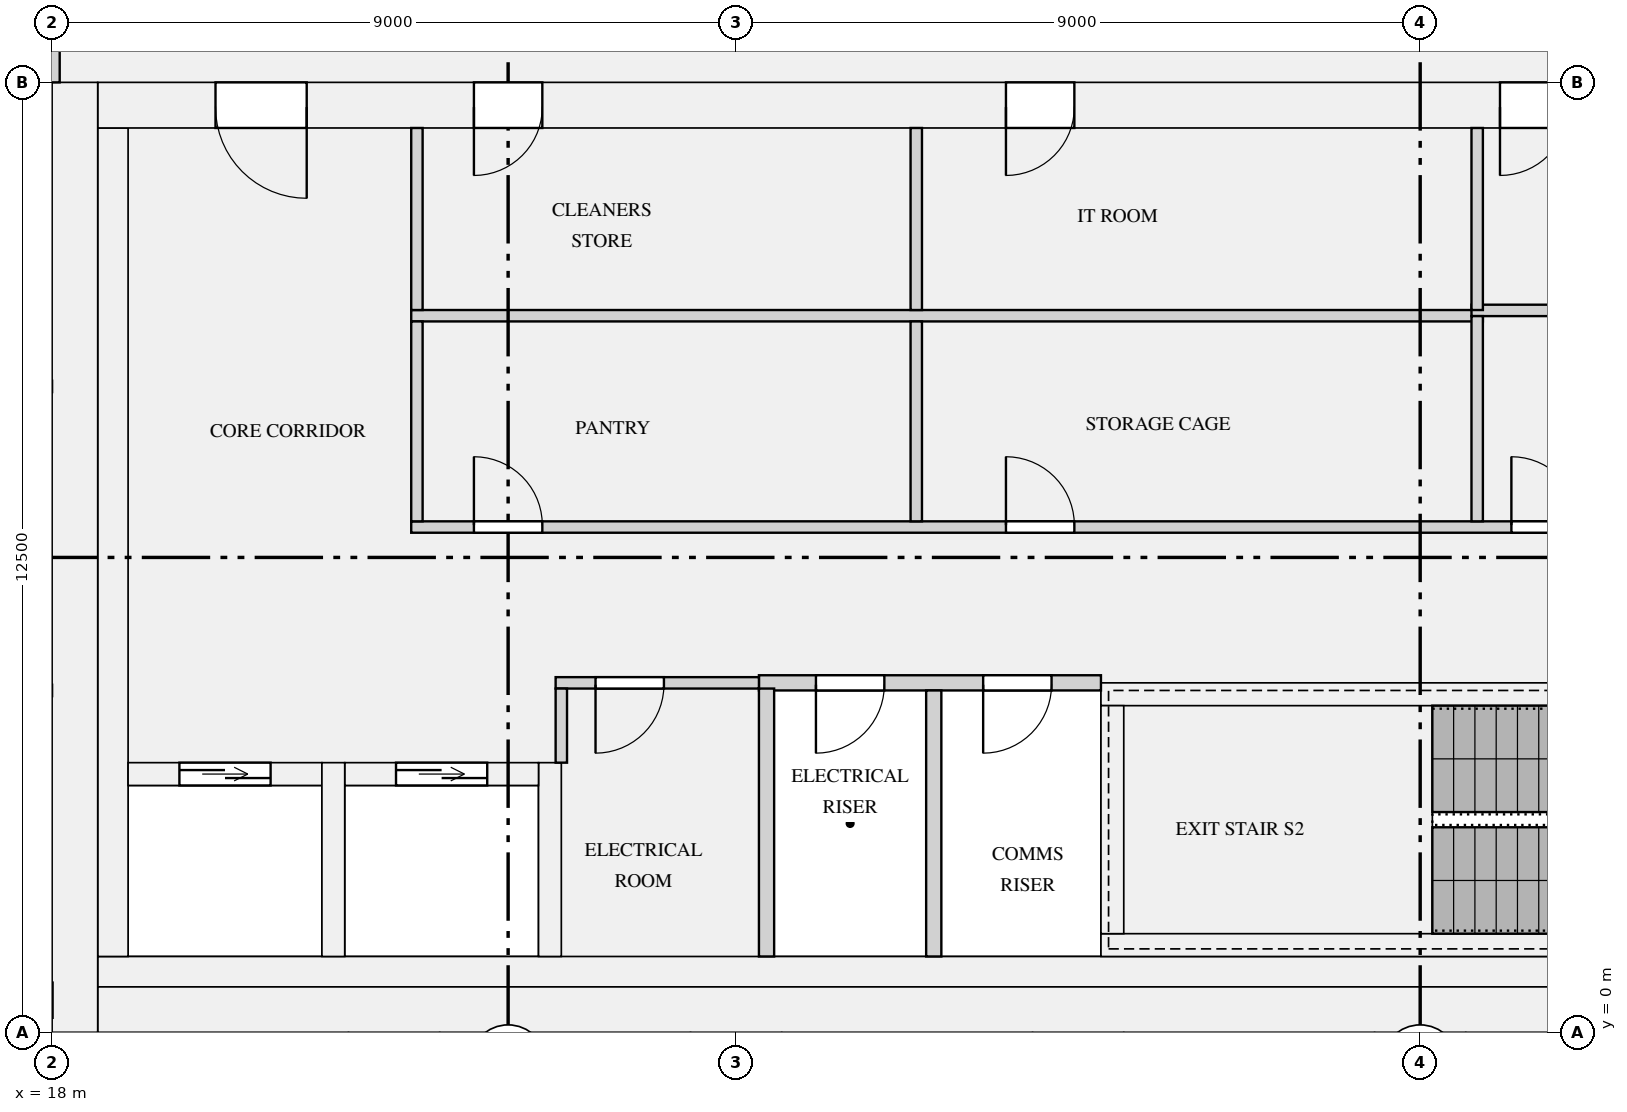
"""IFC4 building model, lengths in metres.
Left out: names, types, materials, properties, quantities, classifications, styles, units other than length and angle.
Written with IfcOpenShell. Run it as: python <this file> out.ifc"""

import sys

from ifc_helpers import new_model, si_unit, direction, frame, frame_2d, origin, place, context, subcontext, project, spatial, rectangle, extrude, element, fill, save


model = new_model("IFC4")
c1 = context("Model", 3, precision=1e-05, world=origin(), true_north=direction((0.0, 1.0)))
c2 = subcontext(c1, "Body", "Model", "MODEL_VIEW")
j1 = project(units=[si_unit("LENGTHUNIT", "METRE"), si_unit("PLANEANGLEUNIT", "RADIAN")], contexts=[c1])
p1 = place(None, origin())
s1 = spatial("IfcSite", under=j1, at=p1, CompositionType="ELEMENT")
p2 = place(p1, origin())
s2 = spatial("IfcBuilding", under=s1, at=p2, CompositionType="ELEMENT")
p3 = place(p2, frame((0.0, 0.0, 229.5)))
s3 = spatial("IfcBuildingStorey", under=s2, at=p3, CompositionType="ELEMENT", Elevation=229.5)
p4 = place(p3, frame((18.3, 0.0, 0.0), z_axis=(0.0, 0.0, 1.0), x_axis=(0.0, 1.0, 0.0)))
e1 = element("IfcWall", 1, at=p4, inside=s3, PredefinedType="SHEAR", context=c2, shape_type="SweptSolid", body=[
    extrude(rectangle(XDim=12.5, YDim=0.6, at=frame_2d((6.25, 0.0))), origin(), (0.0, 0.0, 1.0), 3.15),
])
p5 = place(p3, frame((18.6, 0.3, 0.0), z_axis=(0.0, 0.0, 1.0), x_axis=(1.0, 0.0, 0.0)))
e2 = element("IfcWall", 2, at=p5, inside=s3, PredefinedType="SHEAR", context=c2, shape_type="SweptSolid", body=[
    extrude(rectangle(XDim=34.8, YDim=0.6, at=frame_2d((17.4, 0.0))), origin(), (0.0, 0.0, 1.0), 3.15),
])
p6 = place(p3, frame((18.6, 12.2, 0.0), z_axis=(0.0, 0.0, 1.0), x_axis=(1.0, 0.0, 0.0)))
e3 = element("IfcWall", 3, at=p6, inside=s3, PredefinedType="SHEAR", context=c2, shape_type="SweptSolid", body=[
    extrude(rectangle(XDim=34.8, YDim=0.6, at=frame_2d((17.4, 0.0))), origin(), (0.0, 0.0, 1.0), 3.15),
])
p7 = place(p6, frame((24.575, 0.0, 0.0)))
e4 = element("IfcOpeningElement", 4, at=p7, cuts=e3, PredefinedType="OPENING", context=c2, shape_type="SweptSolid", body=[
    extrude(rectangle(XDim=1.1, YDim=2.1, at=frame_2d((0.55, 1.05))), frame((0.0, 0.31, 0.0), z_axis=(0.0, -1.0, 0.0), x_axis=(1.0, 0.0, 0.0)), (0.0, 0.0, 1.0), 0.62),
])
p8 = place(p6, frame((26.825, 0.0, 0.0)))
e5 = element("IfcOpeningElement", 5, at=p8, cuts=e3, PredefinedType="OPENING", context=c2, shape_type="SweptSolid", body=[
    extrude(rectangle(XDim=1.1, YDim=2.1, at=frame_2d((0.55, 1.05))), frame((0.0, 0.31, 0.0), z_axis=(0.0, -1.0, 0.0), x_axis=(1.0, 0.0, 0.0)), (0.0, 0.0, 1.0), 0.62),
])
p9 = place(p6, frame((29.075, 0.0, 0.0)))
e6 = element("IfcOpeningElement", 6, at=p9, cuts=e3, PredefinedType="OPENING", context=c2, shape_type="SweptSolid", body=[
    extrude(rectangle(XDim=1.1, YDim=2.1, at=frame_2d((0.55, 1.05))), frame((0.0, 0.31, 0.0), z_axis=(0.0, -1.0, 0.0), x_axis=(1.0, 0.0, 0.0)), (0.0, 0.0, 1.0), 0.62),
])
p10 = place(p6, frame((4.95, 0.0, 0.0)))
e7 = element("IfcOpeningElement", 7, at=p10, cuts=e3, PredefinedType="OPENING", context=c2, shape_type="SweptSolid", body=[
    extrude(rectangle(XDim=0.9, YDim=2.1, at=frame_2d((0.45, 1.05))), frame((0.0, 0.31, 0.0), z_axis=(0.0, -1.0, 0.0), x_axis=(1.0, 0.0, 0.0)), (0.0, 0.0, 1.0), 0.62),
])
p11 = place(p6, frame((11.95, 0.0, 0.0)))
e8 = element("IfcOpeningElement", 8, at=p11, cuts=e3, PredefinedType="OPENING", context=c2, shape_type="SweptSolid", body=[
    extrude(rectangle(XDim=0.9, YDim=2.1, at=frame_2d((0.45, 1.05))), frame((0.0, 0.31, 0.0), z_axis=(0.0, -1.0, 0.0), x_axis=(1.0, 0.0, 0.0)), (0.0, 0.0, 1.0), 0.62),
])
p12 = place(p6, frame((18.45, 0.0, 0.0)))
e9 = element("IfcOpeningElement", 9, at=p12, cuts=e3, PredefinedType="OPENING", context=c2, shape_type="SweptSolid", body=[
    extrude(rectangle(XDim=0.9, YDim=2.1, at=frame_2d((0.45, 1.05))), frame((0.0, 0.31, 0.0), z_axis=(0.0, -1.0, 0.0), x_axis=(1.0, 0.0, 0.0)), (0.0, 0.0, 1.0), 0.62),
])
p13 = place(p6, frame((1.55, 0.0, 0.0)))
e10 = element("IfcOpeningElement", 10, at=p13, cuts=e3, PredefinedType="OPENING", context=c2, shape_type="SweptSolid", body=[
    extrude(rectangle(XDim=1.2, YDim=2.1, at=frame_2d((0.6, 1.05))), frame((0.0, 0.31, 0.0), z_axis=(0.0, -1.0, 0.0), x_axis=(1.0, 0.0, 0.0)), (0.0, 0.0, 1.0), 0.62),
])
p14 = place(p6, frame((32.05, 0.0, 0.0)))
e11 = element("IfcOpeningElement", 11, at=p14, cuts=e3, PredefinedType="OPENING", context=c2, shape_type="SweptSolid", body=[
    extrude(rectangle(XDim=1.2, YDim=2.1, at=frame_2d((0.6, 1.05))), frame((0.0, 0.31, 0.0), z_axis=(0.0, -1.0, 0.0), x_axis=(1.0, 0.0, 0.0)), (0.0, 0.0, 1.0), 0.62),
])
p15 = place(p3, frame((18.8, 1.0, 0.0), z_axis=(0.0, 0.0, 1.0), x_axis=(0.0, 1.0, 0.0)))
e12 = element("IfcWall", 12, at=p15, inside=s3, PredefinedType="SHEAR", context=c2, shape_type="SweptSolid", body=[
    extrude(rectangle(XDim=10.9, YDim=0.4, at=frame_2d((5.45, 0.0))), origin(), (0.0, 0.0, 1.0), 3.15),
])
p16 = place(p3, frame((18.6, 0.8, 0.0), z_axis=(0.0, 0.0, 1.0), x_axis=(1.0, 0.0, 0.0)))
e13 = element("IfcWall", 13, at=p16, inside=s3, PredefinedType="SHEAR", context=c2, shape_type="SweptSolid", body=[
    extrude(rectangle(XDim=34.8, YDim=0.4, at=frame_2d((17.4, 0.0))), origin(), (0.0, 0.0, 1.0), 3.15),
])
p17 = place(p3, frame((19.0, 3.4, 0.0), z_axis=(0.0, 0.0, 1.0), x_axis=(1.0, 0.0, 0.0)))
e14 = element("IfcWall", 14, at=p17, inside=s3, PredefinedType="SHEAR", context=c2, shape_type="SweptSolid", body=[
    extrude(rectangle(XDim=2.55, YDim=0.3, at=frame_2d((1.275, 0.0))), origin(), (0.0, 0.0, 1.0), 3.15),
])
p18 = place(p17, frame((0.675, 0.0, 0.0)))
e15 = element("IfcOpeningElement", 15, at=p18, cuts=e14, PredefinedType="OPENING", context=c2, shape_type="SweptSolid", body=[
    extrude(rectangle(XDim=1.2, YDim=2.1, at=frame_2d((0.6, 1.05))), frame((0.0, 0.16, 0.0), z_axis=(0.0, -1.0, 0.0), x_axis=(1.0, 0.0, 0.0)), (0.0, 0.0, 1.0), 0.32),
])
p19 = place(p3, frame((21.85, 3.4, 0.0), z_axis=(0.0, 0.0, 1.0), x_axis=(1.0, 0.0, 0.0)))
e16 = element("IfcWall", 16, at=p19, inside=s3, PredefinedType="SHEAR", context=c2, shape_type="SweptSolid", body=[
    extrude(rectangle(XDim=2.55, YDim=0.3, at=frame_2d((1.275, 0.0))), origin(), (0.0, 0.0, 1.0), 3.15),
])
p20 = place(p19, frame((0.675, 0.0, 0.0)))
e17 = element("IfcOpeningElement", 17, at=p20, cuts=e16, PredefinedType="OPENING", context=c2, shape_type="SweptSolid", body=[
    extrude(rectangle(XDim=1.2, YDim=2.1, at=frame_2d((0.6, 1.05))), frame((0.0, 0.16, 0.0), z_axis=(0.0, -1.0, 0.0), x_axis=(1.0, 0.0, 0.0)), (0.0, 0.0, 1.0), 0.32),
])
for number, where, z_axis, x_axis in (
    (18, (21.7, 1.0, 0.0), (0.0, 0.0, 1.0), (0.0, 1.0, 0.0)),
    (19, (24.55, 1.0, 0.0), (0.0, 0.0, 1.0), (0.0, 1.0, 0.0)),
):
    element("IfcWall", number, at=place(p3, frame(where, z_axis=z_axis, x_axis=x_axis)), inside=s3, PredefinedType="SHEAR", context=c2, shape_type="SweptSolid", body=[
        extrude(rectangle(XDim=2.55, YDim=0.3, at=frame_2d((1.275, 0.0))), origin(), (0.0, 0.0, 1.0), 3.15),
    ])
p21 = place(p3, frame((31.8, 1.15, 0.0), z_axis=(0.0, 0.0, 1.0), x_axis=(1.0, 0.0, 0.0)))
e20 = element("IfcWall", 20, at=p21, inside=s3, PredefinedType="SHEAR", context=c2, shape_type="SweptSolid", body=[
    extrude(rectangle(XDim=8.4, YDim=0.3, at=frame_2d((4.2, 0.0))), origin(), (0.0, 0.0, 1.0), 3.15),
])
p22 = place(p3, frame((31.8, 4.45, 0.0), z_axis=(0.0, 0.0, 1.0), x_axis=(1.0, 0.0, 0.0)))
e21 = element("IfcWall", 21, at=p22, inside=s3, PredefinedType="SHEAR", context=c2, shape_type="SweptSolid", body=[
    extrude(rectangle(XDim=8.4, YDim=0.3, at=frame_2d((4.2, 0.0))), origin(), (0.0, 0.0, 1.0), 3.15),
])
p23 = place(p22, frame((6.8, 0.0, 0.0)))
e22 = element("IfcOpeningElement", 22, at=p23, cuts=e21, PredefinedType="OPENING", context=c2, shape_type="SweptSolid", body=[
    extrude(rectangle(XDim=1.1, YDim=2.1, at=frame_2d((0.55, 1.05))), frame((0.0, 0.16, 0.0), z_axis=(0.0, -1.0, 0.0), x_axis=(1.0, 0.0, 0.0)), (0.0, 0.0, 1.0), 0.32),
])
p24 = place(p3, frame((31.95, 1.3, 0.0), z_axis=(0.0, 0.0, 1.0), x_axis=(0.0, 1.0, 0.0)))
e23 = element("IfcWall", 23, at=p24, inside=s3, PredefinedType="SHEAR", context=c2, shape_type="SweptSolid", body=[
    extrude(rectangle(XDim=3.0, YDim=0.3, at=frame_2d((1.5, 0.0))), origin(), (0.0, 0.0, 1.0), 3.15),
])
p25 = place(p3, frame((27.3, 4.6, 0.0), z_axis=(0.0, 0.0, 1.0), x_axis=(1.0, 0.0, 0.0)))
e24 = element("IfcWall", 24, at=p25, inside=s3, PredefinedType="PARTITIONING", context=c2, shape_type="SweptSolid", body=[
    extrude(rectangle(XDim=4.5, YDim=0.2, at=frame_2d((2.25, 0.0))), origin(), (0.0, 0.0, 1.0), 2.83),
])
p26 = place(p25, frame((0.75, 0.0, 0.0)))
e25 = element("IfcOpeningElement", 25, at=p26, cuts=e24, PredefinedType="OPENING", context=c2, shape_type="SweptSolid", body=[
    extrude(rectangle(XDim=0.9, YDim=2.1, at=frame_2d((0.45, 1.05))), frame((0.0, 0.11, 0.0), z_axis=(0.0, -1.0, 0.0), x_axis=(1.0, 0.0, 0.0)), (0.0, 0.0, 1.0), 0.22),
])
p27 = place(p25, frame((2.95, 0.0, 0.0)))
e26 = element("IfcOpeningElement", 26, at=p27, cuts=e24, PredefinedType="OPENING", context=c2, shape_type="SweptSolid", body=[
    extrude(rectangle(XDim=0.9, YDim=2.1, at=frame_2d((0.45, 1.05))), frame((0.0, 0.11, 0.0), z_axis=(0.0, -1.0, 0.0), x_axis=(1.0, 0.0, 0.0)), (0.0, 0.0, 1.0), 0.22),
])
p28 = place(p3, frame((24.625, 4.6, 0.0), z_axis=(0.0, 0.0, 1.0), x_axis=(1.0, 0.0, 0.0)))
e27 = element("IfcWall", 27, at=p28, inside=s3, PredefinedType="PARTITIONING", context=c2, shape_type="SweptSolid", body=[
    extrude(rectangle(XDim=2.675, YDim=0.15, at=frame_2d((1.337, 0.0))), origin(), (0.0, 0.0, 1.0), 2.83),
])
p29 = place(p28, frame((0.525, 0.0, 0.0)))
e28 = element("IfcOpeningElement", 28, at=p29, cuts=e27, PredefinedType="OPENING", context=c2, shape_type="SweptSolid", body=[
    extrude(rectangle(XDim=0.9, YDim=2.1, at=frame_2d((0.45, 1.05))), frame((0.0, 0.085, 0.0), z_axis=(0.0, -1.0, 0.0), x_axis=(1.0, 0.0, 0.0)), (0.0, 0.0, 1.0), 0.17),
])
p30 = place(p3, frame((22.725, 6.65, 0.0), z_axis=(0.0, 0.0, 1.0), x_axis=(1.0, 0.0, 0.0)))
e29 = element("IfcWall", 29, at=p30, inside=s3, PredefinedType="PARTITIONING", context=c2, shape_type="SweptSolid", body=[
    extrude(rectangle(XDim=19.8, YDim=0.15, at=frame_2d((9.9, 0.0))), origin(), (0.0, 0.0, 1.0), 2.83),
])
p31 = place(p30, frame((0.825, 0.0, 0.0)))
e30 = element("IfcOpeningElement", 30, at=p31, cuts=e29, PredefinedType="OPENING", context=c2, shape_type="SweptSolid", body=[
    extrude(rectangle(XDim=0.9, YDim=2.1, at=frame_2d((0.45, 1.05))), frame((0.0, 0.085, 0.0), z_axis=(0.0, -1.0, 0.0), x_axis=(1.0, 0.0, 0.0)), (0.0, 0.0, 1.0), 0.17),
])
p32 = place(p30, frame((7.825, 0.0, 0.0)))
e31 = element("IfcOpeningElement", 31, at=p32, cuts=e29, PredefinedType="OPENING", context=c2, shape_type="SweptSolid", body=[
    extrude(rectangle(XDim=0.9, YDim=2.1, at=frame_2d((0.45, 1.05))), frame((0.0, 0.085, 0.0), z_axis=(0.0, -1.0, 0.0), x_axis=(1.0, 0.0, 0.0)), (0.0, 0.0, 1.0), 0.17),
])
p33 = place(p30, frame((14.475, 0.0, 0.0)))
e32 = element("IfcOpeningElement", 32, at=p33, cuts=e29, PredefinedType="OPENING", context=c2, shape_type="SweptSolid", body=[
    extrude(rectangle(XDim=0.9, YDim=2.1, at=frame_2d((0.45, 1.05))), frame((0.0, 0.085, 0.0), z_axis=(0.0, -1.0, 0.0), x_axis=(1.0, 0.0, 0.0)), (0.0, 0.0, 1.0), 0.17),
])
p34 = place(p3, frame((22.725, 9.43, 0.0), z_axis=(0.0, 0.0, 1.0), x_axis=(1.0, 0.0, 0.0)))
e33 = element("IfcWall", 33, at=p34, inside=s3, PredefinedType="PARTITIONING", context=c2, shape_type="SweptSolid", body=[
    extrude(rectangle(XDim=14.1, YDim=0.15, at=frame_2d((7.05, 0.0))), origin(), (0.0, 0.0, 1.0), 2.83),
])
p35 = place(p3, frame((36.675, 9.5, 0.0), z_axis=(0.0, 0.0, 1.0), x_axis=(1.0, 0.0, 0.0)))
e34 = element("IfcWall", 34, at=p35, inside=s3, PredefinedType="PARTITIONING", context=c2, shape_type="SweptSolid", body=[
    extrude(rectangle(XDim=5.775, YDim=0.15, at=frame_2d((2.887, 0.0))), origin(), (0.0, 0.0, 1.0), 2.83),
])
p36 = place(p3, frame((27.4, 1.0, 0.0), z_axis=(0.0, 0.0, 1.0), x_axis=(0.0, 1.0, 0.0)))
e35 = element("IfcWall", 35, at=p36, inside=s3, PredefinedType="PARTITIONING", context=c2, shape_type="SweptSolid", body=[
    extrude(rectangle(XDim=3.525, YDim=0.2, at=frame_2d((1.762, 0.0))), origin(), (0.0, 0.0, 1.0), 2.83),
])
p37 = place(p3, frame((29.6, 1.0, 0.0), z_axis=(0.0, 0.0, 1.0), x_axis=(0.0, 1.0, 0.0)))
e36 = element("IfcWall", 36, at=p37, inside=s3, PredefinedType="PARTITIONING", context=c2, shape_type="SweptSolid", body=[
    extrude(rectangle(XDim=3.5, YDim=0.2, at=frame_2d((1.75, 0.0))), origin(), (0.0, 0.0, 1.0), 2.83),
])
p38 = place(p3, frame((24.7, 3.55, 0.0), z_axis=(0.0, 0.0, 1.0), x_axis=(0.0, 1.0, 0.0)))
e37 = element("IfcWall", 37, at=p38, inside=s3, PredefinedType="PARTITIONING", context=c2, shape_type="SweptSolid", body=[
    extrude(rectangle(XDim=0.975, YDim=0.15, at=frame_2d((0.487, 0.0))), origin(), (0.0, 0.0, 1.0), 2.83),
])
for number, where, z_axis, x_axis in (
    (38, (22.8, 6.725, 0.0), (0.0, 0.0, 1.0), (0.0, 1.0, 0.0)),
    (39, (29.37, 6.725, 0.0), (0.0, 0.0, 1.0), (0.0, 1.0, 0.0)),
):
    element("IfcWall", number, at=place(p3, frame(where, z_axis=z_axis, x_axis=x_axis)), inside=s3, PredefinedType="PARTITIONING", context=c2, shape_type="SweptSolid", body=[
        extrude(rectangle(XDim=2.63, YDim=0.15, at=frame_2d((1.315, 0.0))), origin(), (0.0, 0.0, 1.0), 2.83),
    ])
p39 = place(p3, frame((36.75, 6.725, 0.0), z_axis=(0.0, 0.0, 1.0), x_axis=(0.0, 1.0, 0.0)))
e40 = element("IfcWall", 40, at=p39, inside=s3, PredefinedType="PARTITIONING", context=c2, shape_type="SweptSolid", body=[
    extrude(rectangle(XDim=2.7, YDim=0.15, at=frame_2d((1.35, 0.0))), origin(), (0.0, 0.0, 1.0), 2.83),
])
for number, where, z_axis, x_axis in (
    (41, (22.8, 9.505, 0.0), (0.0, 0.0, 1.0), (0.0, 1.0, 0.0)),
    (42, (29.37, 9.505, 0.0), (0.0, 0.0, 1.0), (0.0, 1.0, 0.0)),
    (43, (36.75, 9.505, 0.0), (0.0, 0.0, 1.0), (0.0, 1.0, 0.0)),
):
    element("IfcWall", number, at=place(p3, frame(where, z_axis=z_axis, x_axis=x_axis)), inside=s3, PredefinedType="PARTITIONING", context=c2, shape_type="SweptSolid", body=[
        extrude(rectangle(XDim=2.395, YDim=0.15, at=frame_2d((1.198, 0.0))), origin(), (0.0, 0.0, 1.0), 2.83),
    ])
p40 = place(p3, frame((18.0, 12.5, 0.0), z_axis=(0.0, 0.0, 1.0), x_axis=(0.0, 1.0, 0.0)))
e44 = element("IfcWall", 44, at=p40, inside=s3, PredefinedType="PARTITIONING", context=c2, shape_type="SweptSolid", body=[
    extrude(rectangle(XDim=3.4, YDim=0.2, at=frame_2d((1.7, 0.0))), origin(), (0.0, 0.0, 1.0), 2.83),
])
p41 = place(p18, origin())
e45 = element("IfcDoor", 45, at=p41, inside=s3, OperationType="DOUBLE_DOOR_SLIDING", PredefinedType="DOOR", context=c2, shape_type="SweptSolid", body=[
    extrude(rectangle(XDim=1.2, YDim=2.1, at=frame_2d((0.6, 1.05))), frame((0.0, 0.025, 0.0), z_axis=(0.0, -1.0, 0.0), x_axis=(1.0, 0.0, 0.0)), (0.0, 0.0, 1.0), 0.05),
])
fill(e15, e45)
p42 = place(p20, origin())
e46 = element("IfcDoor", 46, at=p42, inside=s3, OperationType="DOUBLE_DOOR_SLIDING", PredefinedType="DOOR", context=c2, shape_type="SweptSolid", body=[
    extrude(rectangle(XDim=1.2, YDim=2.1, at=frame_2d((0.6, 1.05))), frame((0.0, 0.025, 0.0), z_axis=(0.0, -1.0, 0.0), x_axis=(1.0, 0.0, 0.0)), (0.0, 0.0, 1.0), 0.05),
])
fill(e17, e46)
p43 = place(p29, frame((0.9, 0.0, 0.0), z_axis=(0.0, 0.0, 1.0), x_axis=(-1.0, 0.0, 0.0)))
e47 = element("IfcDoor", 47, at=p43, inside=s3, OperationType="SINGLE_SWING_RIGHT", PredefinedType="DOOR", context=c2, shape_type="SweptSolid", body=[
    extrude(rectangle(XDim=0.9, YDim=2.1, at=frame_2d((0.45, 1.05))), frame((0.0, 0.025, 0.0), z_axis=(0.0, -1.0, 0.0), x_axis=(1.0, 0.0, 0.0)), (0.0, 0.0, 1.0), 0.05),
])
fill(e28, e47)
p44 = place(p31, origin())
e48 = element("IfcDoor", 48, at=p44, inside=s3, OperationType="SINGLE_SWING_LEFT", PredefinedType="DOOR", context=c2, shape_type="SweptSolid", body=[
    extrude(rectangle(XDim=0.9, YDim=2.1, at=frame_2d((0.45, 1.05))), frame((0.0, 0.025, 0.0), z_axis=(0.0, -1.0, 0.0), x_axis=(1.0, 0.0, 0.0)), (0.0, 0.0, 1.0), 0.05),
])
fill(e30, e48)
p45 = place(p32, origin())
e49 = element("IfcDoor", 49, at=p45, inside=s3, OperationType="SINGLE_SWING_LEFT", PredefinedType="DOOR", context=c2, shape_type="SweptSolid", body=[
    extrude(rectangle(XDim=0.9, YDim=2.1, at=frame_2d((0.45, 1.05))), frame((0.0, 0.025, 0.0), z_axis=(0.0, -1.0, 0.0), x_axis=(1.0, 0.0, 0.0)), (0.0, 0.0, 1.0), 0.05),
])
fill(e31, e49)
p46 = place(p10, frame((0.9, 0.0, 0.0), z_axis=(0.0, 0.0, 1.0), x_axis=(-1.0, 0.0, 0.0)))
e50 = element("IfcDoor", 50, at=p46, inside=s3, OperationType="SINGLE_SWING_RIGHT", PredefinedType="DOOR", context=c2, shape_type="SweptSolid", body=[
    extrude(rectangle(XDim=0.9, YDim=2.1, at=frame_2d((0.45, 1.05))), frame((0.0, 0.025, 0.0), z_axis=(0.0, -1.0, 0.0), x_axis=(1.0, 0.0, 0.0)), (0.0, 0.0, 1.0), 0.05),
])
fill(e7, e50)
p47 = place(p11, frame((0.9, 0.0, 0.0), z_axis=(0.0, 0.0, 1.0), x_axis=(-1.0, 0.0, 0.0)))
e51 = element("IfcDoor", 51, at=p47, inside=s3, OperationType="SINGLE_SWING_RIGHT", PredefinedType="DOOR", context=c2, shape_type="SweptSolid", body=[
    extrude(rectangle(XDim=0.9, YDim=2.1, at=frame_2d((0.45, 1.05))), frame((0.0, 0.025, 0.0), z_axis=(0.0, -1.0, 0.0), x_axis=(1.0, 0.0, 0.0)), (0.0, 0.0, 1.0), 0.05),
])
fill(e8, e51)
p48 = place(p33, origin())
e52 = element("IfcDoor", 52, at=p48, inside=s3, OperationType="SINGLE_SWING_LEFT", PredefinedType="DOOR", context=c2, shape_type="SweptSolid", body=[
    extrude(rectangle(XDim=0.9, YDim=2.1, at=frame_2d((0.45, 1.05))), frame((0.0, 0.025, 0.0), z_axis=(0.0, -1.0, 0.0), x_axis=(1.0, 0.0, 0.0)), (0.0, 0.0, 1.0), 0.05),
])
fill(e32, e52)
p49 = place(p12, frame((0.9, 0.0, 0.0), z_axis=(0.0, 0.0, 1.0), x_axis=(-1.0, 0.0, 0.0)))
e53 = element("IfcDoor", 53, at=p49, inside=s3, OperationType="SINGLE_SWING_RIGHT", PredefinedType="DOOR", context=c2, shape_type="SweptSolid", body=[
    extrude(rectangle(XDim=0.9, YDim=2.1, at=frame_2d((0.45, 1.05))), frame((0.0, 0.025, 0.0), z_axis=(0.0, -1.0, 0.0), x_axis=(1.0, 0.0, 0.0)), (0.0, 0.0, 1.0), 0.05),
])
fill(e9, e53)
p50 = place(p26, frame((0.9, 0.0, 0.0), z_axis=(0.0, 0.0, 1.0), x_axis=(-1.0, 0.0, 0.0)))
e54 = element("IfcDoor", 54, at=p50, inside=s3, OperationType="SINGLE_SWING_RIGHT", PredefinedType="DOOR", context=c2, shape_type="SweptSolid", body=[
    extrude(rectangle(XDim=0.9, YDim=2.1, at=frame_2d((0.45, 1.05))), frame((0.0, 0.025, 0.0), z_axis=(0.0, -1.0, 0.0), x_axis=(1.0, 0.0, 0.0)), (0.0, 0.0, 1.0), 0.05),
])
fill(e25, e54)
p51 = place(p27, frame((0.9, 0.0, 0.0), z_axis=(0.0, 0.0, 1.0), x_axis=(-1.0, 0.0, 0.0)))
e55 = element("IfcDoor", 55, at=p51, inside=s3, OperationType="SINGLE_SWING_RIGHT", PredefinedType="DOOR", context=c2, shape_type="SweptSolid", body=[
    extrude(rectangle(XDim=0.9, YDim=2.1, at=frame_2d((0.45, 1.05))), frame((0.0, 0.025, 0.0), z_axis=(0.0, -1.0, 0.0), x_axis=(1.0, 0.0, 0.0)), (0.0, 0.0, 1.0), 0.05),
])
fill(e26, e55)
p52 = place(p13, frame((1.2, 0.0, 0.0), z_axis=(0.0, 0.0, 1.0), x_axis=(-1.0, 0.0, 0.0)))
e56 = element("IfcDoor", 56, at=p52, inside=s3, OperationType="SINGLE_SWING_LEFT", PredefinedType="DOOR", context=c2, shape_type="SweptSolid", body=[
    extrude(rectangle(XDim=1.2, YDim=2.1, at=frame_2d((0.6, 1.05))), frame((0.0, 0.025, 0.0), z_axis=(0.0, -1.0, 0.0), x_axis=(1.0, 0.0, 0.0)), (0.0, 0.0, 1.0), 0.05),
])
fill(e10, e56)
save(model, sys.argv[1])
